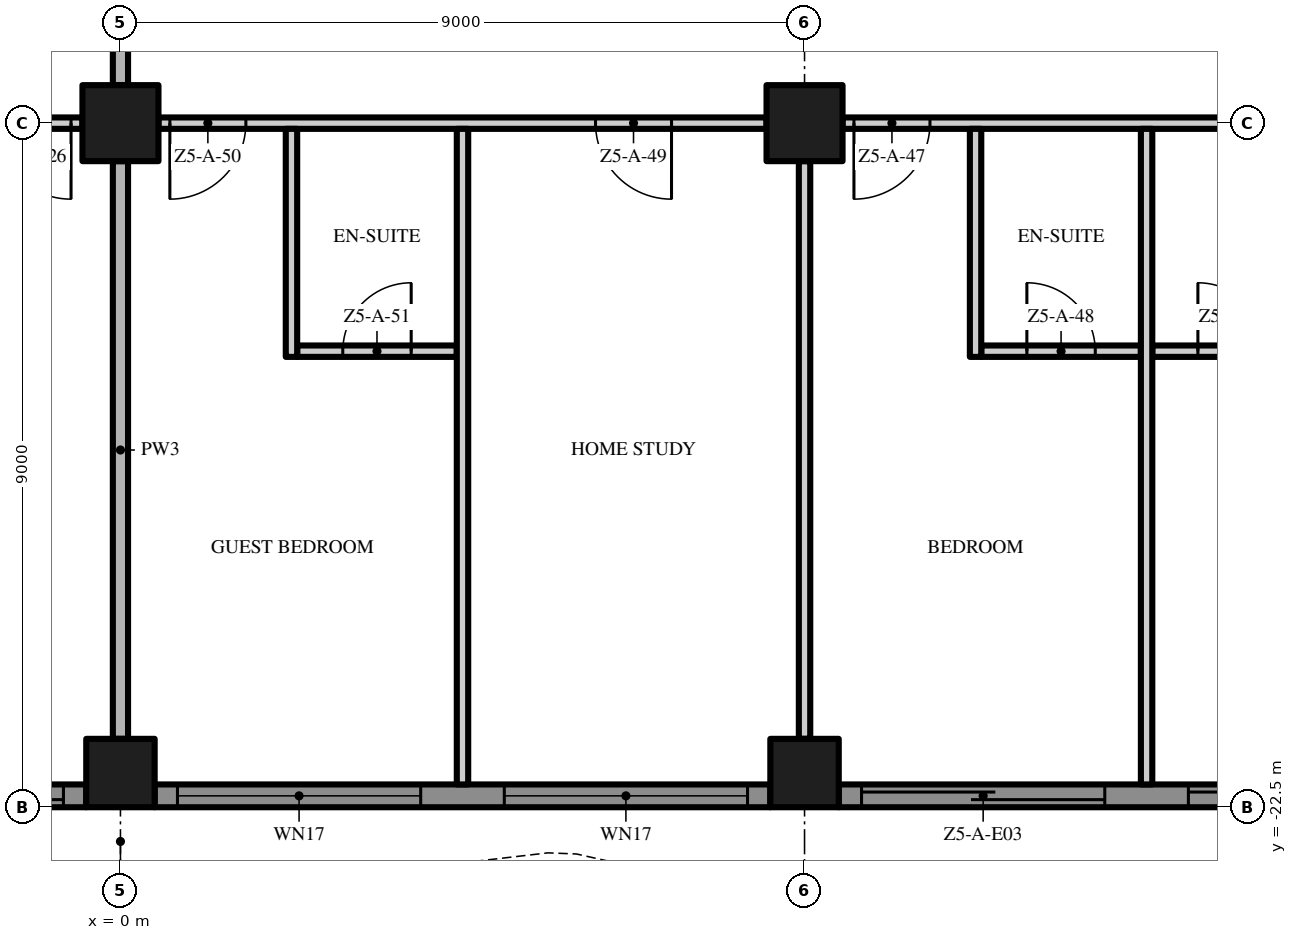
"""IFC4 building model, lengths in metres.
Left out: names, types, materials, properties, quantities, classifications, styles, units other than length and angle.
Written with IfcOpenShell. Run it as: python <this file> out.ifc"""

import sys

from ifc_helpers import new_model, si_unit, direction, frame, frame_2d, origin, origin_2d, place, context, subcontext, project, spatial, polyline, rectangle, outline, extrude, element, fill, save


model = new_model("IFC4")
c1 = context("Model", 3, precision=1e-05, world=origin(), true_north=direction((0.0, 1.0)))
c2 = subcontext(c1, "Body", "Model", "MODEL_VIEW")
j1 = project(units=[si_unit("LENGTHUNIT", "METRE"), si_unit("PLANEANGLEUNIT", "RADIAN")], contexts=[c1])
p1 = place(None, origin())
s1 = spatial("IfcSite", under=j1, at=p1, CompositionType="ELEMENT")
p2 = place(p1, origin())
s2 = spatial("IfcBuilding", under=s1, at=p2, CompositionType="ELEMENT")
p3 = place(p2, frame((0.0, 0.0, 238.8)))
s3 = spatial("IfcBuildingStorey", under=s2, at=p3, CompositionType="ELEMENT", Elevation=238.8)
p4 = place(p3, frame((0.0, -13.5, 0.0), z_axis=(0.0, 0.0, 1.0), x_axis=(1.0, 0.0, 0.0)))
e1 = element("IfcColumn", 1, at=p4, inside=s3, PredefinedType="COLUMN", context=c2, shape_type="SweptSolid", body=[
    extrude(rectangle(XDim=1.0, YDim=1.0, at=origin_2d()), origin(), (0.0, 0.0, 1.0), 3.5),
])
p5 = place(p3, frame((0.0, -22.05, 0.0), z_axis=(0.0, 0.0, 1.0), x_axis=(1.0, 0.0, 0.0)))
e2 = element("IfcColumn", 2, at=p5, inside=s3, PredefinedType="COLUMN", context=c2, shape_type="SweptSolid", body=[
    extrude(rectangle(XDim=0.9, YDim=0.9, at=origin_2d()), origin(), (0.0, 0.0, 1.0), 3.5),
])
p6 = place(p3, frame((9.0, -13.5, 0.0), z_axis=(0.0, 0.0, 1.0), x_axis=(1.0, 0.0, 0.0)))
e3 = element("IfcColumn", 3, at=p6, inside=s3, PredefinedType="COLUMN", context=c2, shape_type="SweptSolid", body=[
    extrude(rectangle(XDim=1.0, YDim=1.0, at=origin_2d()), origin(), (0.0, 0.0, 1.0), 3.5),
])
p7 = place(p3, frame((9.0, -22.05, 0.0), z_axis=(0.0, 0.0, 1.0), x_axis=(1.0, 0.0, 0.0)))
e4 = element("IfcColumn", 4, at=p7, inside=s3, PredefinedType="COLUMN", context=c2, shape_type="SweptSolid", body=[
    extrude(rectangle(XDim=0.9, YDim=0.9, at=origin_2d()), origin(), (0.0, 0.0, 1.0), 3.5),
])
p8 = place(p3, frame((-0.45, -22.35, 0.0), z_axis=(0.0, 0.0, 1.0), x_axis=(-1.0, 0.0, 0.0)))
e5 = element("IfcWall", 5, at=p8, inside=s3, PredefinedType="SOLIDWALL", context=c2, shape_type="SweptSolid", body=[
    extrude(rectangle(XDim=8.1, YDim=0.3, at=frame_2d((4.05, 0.0))), origin(), (0.0, 0.0, 1.0), 3.5),
])
p9 = place(p8, frame((4.6, 0.0, 0.45)))
e6 = element("IfcOpeningElement", 6, at=p9, cuts=e5, PredefinedType="OPENING", context=c2, shape_type="SweptSolid", body=[
    extrude(rectangle(XDim=3.2, YDim=2.65, at=frame_2d((1.6, 1.325))), frame((0.0, 0.16, 0.0), z_axis=(0.0, -1.0, 0.0), x_axis=(1.0, 0.0, 0.0)), (0.0, 0.0, 1.0), 0.32),
])
p10 = place(p8, frame((0.3, 0.0, 0.0)))
e7 = element("IfcOpeningElement", 7, at=p10, cuts=e5, PredefinedType="OPENING", context=c2, shape_type="SweptSolid", body=[
    extrude(rectangle(XDim=3.2, YDim=2.4, at=frame_2d((1.6, 1.2))), frame((0.0, 0.16, 0.0), z_axis=(0.0, -1.0, 0.0), x_axis=(1.0, 0.0, 0.0)), (0.0, 0.0, 1.0), 0.32),
])
p11 = place(p3, frame((8.55, -22.35, 0.0), z_axis=(0.0, 0.0, 1.0), x_axis=(-1.0, 0.0, 0.0)))
e8 = element("IfcWall", 8, at=p11, inside=s3, PredefinedType="SOLIDWALL", context=c2, shape_type="SweptSolid", body=[
    extrude(rectangle(XDim=8.1, YDim=0.3, at=frame_2d((4.05, 0.0))), origin(), (0.0, 0.0, 1.0), 3.5),
])
p12 = place(p11, frame((4.6, 0.0, 0.45)))
e9 = element("IfcOpeningElement", 9, at=p12, cuts=e8, PredefinedType="OPENING", context=c2, shape_type="SweptSolid", body=[
    extrude(rectangle(XDim=3.2, YDim=2.65, at=frame_2d((1.6, 1.325))), frame((0.0, 0.16, 0.0), z_axis=(0.0, -1.0, 0.0), x_axis=(1.0, 0.0, 0.0)), (0.0, 0.0, 1.0), 0.32),
])
p13 = place(p11, frame((0.3, 0.0, 0.45)))
e10 = element("IfcOpeningElement", 10, at=p13, cuts=e8, PredefinedType="OPENING", context=c2, shape_type="SweptSolid", body=[
    extrude(rectangle(XDim=3.2, YDim=2.65, at=frame_2d((1.6, 1.325))), frame((0.0, 0.16, 0.0), z_axis=(0.0, -1.0, 0.0), x_axis=(1.0, 0.0, 0.0)), (0.0, 0.0, 1.0), 0.32),
])
p14 = place(p3, frame((17.55, -22.35, 0.0), z_axis=(0.0, 0.0, 1.0), x_axis=(-1.0, 0.0, 0.0)))
e11 = element("IfcWall", 11, at=p14, inside=s3, PredefinedType="SOLIDWALL", context=c2, shape_type="SweptSolid", body=[
    extrude(rectangle(XDim=8.1, YDim=0.3, at=frame_2d((4.05, 0.0))), origin(), (0.0, 0.0, 1.0), 3.5),
])
p15 = place(p14, frame((4.6, 0.0, 0.0)))
e12 = element("IfcOpeningElement", 12, at=p15, cuts=e11, PredefinedType="OPENING", context=c2, shape_type="SweptSolid", body=[
    extrude(rectangle(XDim=3.2, YDim=2.4, at=frame_2d((1.6, 1.2))), frame((0.0, 0.16, 0.0), z_axis=(0.0, -1.0, 0.0), x_axis=(1.0, 0.0, 0.0)), (0.0, 0.0, 1.0), 0.32),
])
p16 = place(p14, frame((0.3, 0.0, 0.0)))
e13 = element("IfcOpeningElement", 13, at=p16, cuts=e11, PredefinedType="OPENING", context=c2, shape_type="SweptSolid", body=[
    extrude(rectangle(XDim=3.2, YDim=2.4, at=frame_2d((1.6, 1.2))), frame((0.0, 0.16, 0.0), z_axis=(0.0, -1.0, 0.0), x_axis=(1.0, 0.0, 0.0)), (0.0, 0.0, 1.0), 0.32),
])
p17 = place(p3, origin())
e14 = element("IfcWall", 14, at=p17, inside=s3, PredefinedType="USERDEFINED", context=c2, shape_type="SweptSolid", body=[
    extrude(outline(polyline([(-22.5, -23.451), (-21.0, -24.112), (-19.5, -24.845), (-18.0, -25.369), (-16.875, -25.5), (-16.5, -25.485), (-15.0, -25.149), (-13.5, -24.488), (-12.0, -23.755), (-10.5, -23.231), (-9.375, -23.1), (-9.0, -23.115), (-7.5, -23.451), (-6.0, -24.112), (-4.5, -24.845), (-3.0, -25.369), (-1.875, -25.5), (-1.5, -25.485), (0.0, -25.149), (1.5, -24.488), (3.0, -23.755), (4.5, -23.231), (5.625, -23.1), (6.0, -23.115), (7.5, -23.451), (9.0, -24.112), (10.5, -24.845), (12.0, -25.369), (13.125, -25.5), (13.5, -25.485), (15.0, -25.149), (16.5, -24.488), (18.0, -23.755), (19.5, -23.231), (20.625, -23.1), (21.0, -23.115), (22.5, -23.451), (22.555, -23.208), (21.033, -22.866), (20.615, -22.849), (19.444, -22.986), (17.904, -23.524), (16.395, -24.261), (14.921, -24.91), (13.467, -25.236), (13.135, -25.249), (12.056, -25.124), (10.596, -24.614), (9.105, -23.885), (7.579, -23.213), (6.033, -22.866), (5.615, -22.849), (4.444, -22.986), (2.904, -23.524), (1.395, -24.261), (-0.079, -24.91), (-1.533, -25.236), (-1.865, -25.249), (-2.944, -25.124), (-4.404, -24.614), (-5.895, -23.885), (-7.421, -23.213), (-8.967, -22.866), (-9.385, -22.849), (-10.556, -22.986), (-12.096, -23.524), (-13.605, -24.261), (-15.079, -24.91), (-16.533, -25.236), (-16.865, -25.249), (-17.944, -25.124), (-19.404, -24.614), (-20.895, -23.885), (-22.399, -23.223), (-22.5, -23.451)])), origin(), (0.0, 0.0, 1.0), 0.9),
])
p18 = place(p3, frame((2.325, -16.5, 0.0), z_axis=(0.0, 0.0, 1.0), x_axis=(1.0, 0.0, 0.0)))
e15 = element("IfcWall", 15, at=p18, inside=s3, PredefinedType="PARTITIONING", context=c2, shape_type="SweptSolid", body=[
    extrude(rectangle(XDim=2.1, YDim=0.15, at=frame_2d((1.05, 0.0))), origin(), (0.0, 0.0, 1.0), 3.5),
])
p19 = place(p18, frame((0.6, 0.0, 0.0)))
e16 = element("IfcOpeningElement", 16, at=p19, cuts=e15, PredefinedType="OPENING", context=c2, shape_type="SweptSolid", body=[
    extrude(rectangle(XDim=0.9, YDim=2.1, at=frame_2d((0.45, 1.05))), frame((0.0, 0.085, 0.0), z_axis=(0.0, -1.0, 0.0), x_axis=(1.0, 0.0, 0.0)), (0.0, 0.0, 1.0), 0.17),
])
p20 = place(p3, frame((11.325, -16.5, 0.0), z_axis=(0.0, 0.0, 1.0), x_axis=(1.0, 0.0, 0.0)))
e17 = element("IfcWall", 17, at=p20, inside=s3, PredefinedType="PARTITIONING", context=c2, shape_type="SweptSolid", body=[
    extrude(rectangle(XDim=2.1, YDim=0.15, at=frame_2d((1.05, 0.0))), origin(), (0.0, 0.0, 1.0), 3.5),
])
p21 = place(p20, frame((0.6, 0.0, 0.0)))
e18 = element("IfcOpeningElement", 18, at=p21, cuts=e17, PredefinedType="OPENING", context=c2, shape_type="SweptSolid", body=[
    extrude(rectangle(XDim=0.9, YDim=2.1, at=frame_2d((0.45, 1.05))), frame((0.0, 0.085, 0.0), z_axis=(0.0, -1.0, 0.0), x_axis=(1.0, 0.0, 0.0)), (0.0, 0.0, 1.0), 0.17),
])
p22 = place(p3, frame((13.575, -16.5, 0.0), z_axis=(0.0, 0.0, 1.0), x_axis=(1.0, 0.0, 0.0)))
e19 = element("IfcWall", 19, at=p22, inside=s3, PredefinedType="PARTITIONING", context=c2, shape_type="SweptSolid", body=[
    extrude(rectangle(XDim=2.1, YDim=0.15, at=frame_2d((1.05, 0.0))), origin(), (0.0, 0.0, 1.0), 3.5),
])
p23 = place(p22, frame((0.6, 0.0, 0.0)))
e20 = element("IfcOpeningElement", 20, at=p23, cuts=e19, PredefinedType="OPENING", context=c2, shape_type="SweptSolid", body=[
    extrude(rectangle(XDim=0.9, YDim=2.1, at=frame_2d((0.45, 1.05))), frame((0.0, 0.085, 0.0), z_axis=(0.0, -1.0, 0.0), x_axis=(1.0, 0.0, 0.0)), (0.0, 0.0, 1.0), 0.17),
])
p24 = place(p3, frame((-0.5, -13.5, 0.0), z_axis=(0.0, 0.0, 1.0), x_axis=(-1.0, 0.0, 0.0)))
e21 = element("IfcWall", 21, at=p24, inside=s3, PredefinedType="PARTITIONING", context=c2, shape_type="SweptSolid", body=[
    extrude(rectangle(XDim=8.0, YDim=0.15, at=frame_2d((4.0, 0.0))), origin(), (0.0, 0.0, 1.0), 3.5),
])
p25 = place(p24, frame((0.15, 0.0, 0.0)))
e22 = element("IfcOpeningElement", 22, at=p25, cuts=e21, PredefinedType="OPENING", context=c2, shape_type="SweptSolid", body=[
    extrude(rectangle(XDim=1.0, YDim=2.4, at=frame_2d((0.5, 1.2))), frame((0.0, 0.085, 0.0), z_axis=(0.0, -1.0, 0.0), x_axis=(1.0, 0.0, 0.0)), (0.0, 0.0, 1.0), 0.17),
])
p26 = place(p24, frame((6.85, 0.0, 0.0)))
e23 = element("IfcOpeningElement", 23, at=p26, cuts=e21, PredefinedType="OPENING", context=c2, shape_type="SweptSolid", body=[
    extrude(rectangle(XDim=1.0, YDim=2.4, at=frame_2d((0.5, 1.2))), frame((0.0, 0.085, 0.0), z_axis=(0.0, -1.0, 0.0), x_axis=(1.0, 0.0, 0.0)), (0.0, 0.0, 1.0), 0.17),
])
p27 = place(p3, frame((8.5, -13.5, 0.0), z_axis=(0.0, 0.0, 1.0), x_axis=(-1.0, 0.0, 0.0)))
e24 = element("IfcWall", 24, at=p27, inside=s3, PredefinedType="PARTITIONING", context=c2, shape_type="SweptSolid", body=[
    extrude(rectangle(XDim=8.0, YDim=0.15, at=frame_2d((4.0, 0.0))), origin(), (0.0, 0.0, 1.0), 3.5),
])
p28 = place(p27, frame((1.25, 0.0, 0.0)))
e25 = element("IfcOpeningElement", 25, at=p28, cuts=e24, PredefinedType="OPENING", context=c2, shape_type="SweptSolid", body=[
    extrude(rectangle(XDim=1.0, YDim=2.4, at=frame_2d((0.5, 1.2))), frame((0.0, 0.085, 0.0), z_axis=(0.0, -1.0, 0.0), x_axis=(1.0, 0.0, 0.0)), (0.0, 0.0, 1.0), 0.17),
])
p29 = place(p27, frame((6.85, 0.0, 0.0)))
e26 = element("IfcOpeningElement", 26, at=p29, cuts=e24, PredefinedType="OPENING", context=c2, shape_type="SweptSolid", body=[
    extrude(rectangle(XDim=1.0, YDim=2.4, at=frame_2d((0.5, 1.2))), frame((0.0, 0.085, 0.0), z_axis=(0.0, -1.0, 0.0), x_axis=(1.0, 0.0, 0.0)), (0.0, 0.0, 1.0), 0.17),
])
p30 = place(p3, frame((17.5, -13.5, 0.0), z_axis=(0.0, 0.0, 1.0), x_axis=(-1.0, 0.0, 0.0)))
e27 = element("IfcWall", 27, at=p30, inside=s3, PredefinedType="PARTITIONING", context=c2, shape_type="SweptSolid", body=[
    extrude(rectangle(XDim=8.0, YDim=0.15, at=frame_2d((4.0, 0.0))), origin(), (0.0, 0.0, 1.0), 3.5),
])
p31 = place(p30, frame((0.15, 0.0, 0.0)))
e28 = element("IfcOpeningElement", 28, at=p31, cuts=e27, PredefinedType="OPENING", context=c2, shape_type="SweptSolid", body=[
    extrude(rectangle(XDim=1.0, YDim=2.4, at=frame_2d((0.5, 1.2))), frame((0.0, 0.085, 0.0), z_axis=(0.0, -1.0, 0.0), x_axis=(1.0, 0.0, 0.0)), (0.0, 0.0, 1.0), 0.17),
])
p32 = place(p30, frame((6.85, 0.0, 0.0)))
e29 = element("IfcOpeningElement", 29, at=p32, cuts=e27, PredefinedType="OPENING", context=c2, shape_type="SweptSolid", body=[
    extrude(rectangle(XDim=1.0, YDim=2.4, at=frame_2d((0.5, 1.2))), frame((0.0, 0.085, 0.0), z_axis=(0.0, -1.0, 0.0), x_axis=(1.0, 0.0, 0.0)), (0.0, 0.0, 1.0), 0.17),
])
p33 = place(p3, frame((0.0, -21.6, 0.0), z_axis=(0.0, 0.0, 1.0), x_axis=(0.0, 1.0, 0.0)))
e30 = element("IfcWall", 30, at=p33, inside=s3, PredefinedType="PARTITIONING", context=c2, shape_type="SweptSolid", body=[
    extrude(rectangle(XDim=7.6, YDim=0.2, at=frame_2d((3.8, 0.0))), origin(), (0.0, 0.0, 1.0), 3.5),
])
p34 = place(p3, frame((0.0, -13.0, 0.0), z_axis=(0.0, 0.0, 1.0), x_axis=(0.0, 1.0, 0.0)))
e31 = element("IfcWall", 31, at=p34, inside=s3, PredefinedType="PARTITIONING", context=c2, shape_type="SweptSolid", body=[
    extrude(rectangle(XDim=8.0, YDim=0.2, at=frame_2d((4.0, 0.0))), origin(), (0.0, 0.0, 1.0), 3.5),
])
p35 = place(p3, frame((2.25, -16.575, 0.0), z_axis=(0.0, 0.0, 1.0), x_axis=(0.0, 1.0, 0.0)))
e32 = element("IfcWall", 32, at=p35, inside=s3, PredefinedType="PARTITIONING", context=c2, shape_type="SweptSolid", body=[
    extrude(rectangle(XDim=3.0, YDim=0.15, at=frame_2d((1.5, 0.0))), origin(), (0.0, 0.0, 1.0), 3.5),
])
p36 = place(p3, frame((4.5, -22.2, 0.0), z_axis=(0.0, 0.0, 1.0), x_axis=(0.0, 1.0, 0.0)))
e33 = element("IfcWall", 33, at=p36, inside=s3, PredefinedType="PARTITIONING", context=c2, shape_type="SweptSolid", body=[
    extrude(rectangle(XDim=8.625, YDim=0.15, at=frame_2d((4.312, 0.0))), origin(), (0.0, 0.0, 1.0), 3.5),
])
p37 = place(p3, frame((9.0, -21.6, 0.0), z_axis=(0.0, 0.0, 1.0), x_axis=(0.0, 1.0, 0.0)))
e34 = element("IfcWall", 34, at=p37, inside=s3, PredefinedType="PARTITIONING", context=c2, shape_type="SweptSolid", body=[
    extrude(rectangle(XDim=7.6, YDim=0.15, at=frame_2d((3.8, 0.0))), origin(), (0.0, 0.0, 1.0), 3.5),
])
p38 = place(p3, frame((11.25, -16.575, 0.0), z_axis=(0.0, 0.0, 1.0), x_axis=(0.0, 1.0, 0.0)))
e35 = element("IfcWall", 35, at=p38, inside=s3, PredefinedType="PARTITIONING", context=c2, shape_type="SweptSolid", body=[
    extrude(rectangle(XDim=3.0, YDim=0.15, at=frame_2d((1.5, 0.0))), origin(), (0.0, 0.0, 1.0), 3.5),
])
p39 = place(p3, frame((13.5, -22.2, 0.0), z_axis=(0.0, 0.0, 1.0), x_axis=(0.0, 1.0, 0.0)))
e36 = element("IfcWall", 36, at=p39, inside=s3, PredefinedType="PARTITIONING", context=c2, shape_type="SweptSolid", body=[
    extrude(rectangle(XDim=8.625, YDim=0.15, at=frame_2d((4.312, 0.0))), origin(), (0.0, 0.0, 1.0), 3.5),
])
p40 = place(p10, origin())
e37 = element("IfcDoor", 37, at=p40, inside=s3, OperationType="SINGLE_SWING_LEFT", PredefinedType="DOOR", context=c2, shape_type="SweptSolid", body=[
    extrude(rectangle(XDim=3.2, YDim=2.4, at=frame_2d((1.6, 1.2))), frame((0.0, 0.025, 0.0), z_axis=(0.0, -1.0, 0.0), x_axis=(1.0, 0.0, 0.0)), (0.0, 0.0, 1.0), 0.05),
])
fill(e7, e37)
p41 = place(p12, origin())
e38 = element("IfcWindow", 38, at=p41, inside=s3, PartitioningType="SINGLE_PANEL", PredefinedType="WINDOW", context=c2, shape_type="SweptSolid", body=[
    extrude(rectangle(XDim=3.2, YDim=2.65, at=frame_2d((1.6, 1.325))), frame((0.0, 0.03, 0.0), z_axis=(0.0, -1.0, 0.0), x_axis=(1.0, 0.0, 0.0)), (0.0, 0.0, 1.0), 0.06),
])
fill(e9, e38)
p42 = place(p13, origin())
e39 = element("IfcWindow", 39, at=p42, inside=s3, PartitioningType="SINGLE_PANEL", PredefinedType="WINDOW", context=c2, shape_type="SweptSolid", body=[
    extrude(rectangle(XDim=3.2, YDim=2.65, at=frame_2d((1.6, 1.325))), frame((0.0, 0.03, 0.0), z_axis=(0.0, -1.0, 0.0), x_axis=(1.0, 0.0, 0.0)), (0.0, 0.0, 1.0), 0.06),
])
fill(e10, e39)
p43 = place(p15, origin())
e40 = element("IfcDoor", 40, at=p43, inside=s3, OperationType="SINGLE_SWING_LEFT", PredefinedType="DOOR", context=c2, shape_type="SweptSolid", body=[
    extrude(rectangle(XDim=3.2, YDim=2.4, at=frame_2d((1.6, 1.2))), frame((0.0, 0.025, 0.0), z_axis=(0.0, -1.0, 0.0), x_axis=(1.0, 0.0, 0.0)), (0.0, 0.0, 1.0), 0.05),
])
fill(e12, e40)
p44 = place(p16, origin())
e41 = element("IfcDoor", 41, at=p44, inside=s3, OperationType="SINGLE_SWING_LEFT", PredefinedType="DOOR", context=c2, shape_type="SweptSolid", body=[
    extrude(rectangle(XDim=3.2, YDim=2.4, at=frame_2d((1.6, 1.2))), frame((0.0, 0.025, 0.0), z_axis=(0.0, -1.0, 0.0), x_axis=(1.0, 0.0, 0.0)), (0.0, 0.0, 1.0), 0.05),
])
fill(e13, e41)
p45 = place(p25, origin())
e42 = element("IfcDoor", 42, at=p45, inside=s3, OperationType="SINGLE_SWING_LEFT", PredefinedType="DOOR", context=c2, shape_type="SweptSolid", body=[
    extrude(rectangle(XDim=1.0, YDim=2.4, at=frame_2d((0.5, 1.2))), frame((0.0, 0.025, 0.0), z_axis=(0.0, -1.0, 0.0), x_axis=(1.0, 0.0, 0.0)), (0.0, 0.0, 1.0), 0.05),
])
fill(e22, e42)
p46 = place(p23, origin())
e43 = element("IfcDoor", 43, at=p46, inside=s3, OperationType="SINGLE_SWING_LEFT", PredefinedType="DOOR", context=c2, shape_type="SweptSolid", body=[
    extrude(rectangle(XDim=0.9, YDim=2.1, at=frame_2d((0.45, 1.05))), frame((0.0, 0.025, 0.0), z_axis=(0.0, -1.0, 0.0), x_axis=(1.0, 0.0, 0.0)), (0.0, 0.0, 1.0), 0.05),
])
fill(e20, e43)
p47 = place(p32, origin())
e44 = element("IfcDoor", 44, at=p47, inside=s3, OperationType="SINGLE_SWING_RIGHT", PredefinedType="DOOR", context=c2, shape_type="SweptSolid", body=[
    extrude(rectangle(XDim=1.0, YDim=2.4, at=frame_2d((0.5, 1.2))), frame((0.0, 0.025, 0.0), z_axis=(0.0, -1.0, 0.0), x_axis=(1.0, 0.0, 0.0)), (0.0, 0.0, 1.0), 0.05),
])
fill(e29, e44)
p48 = place(p21, origin())
e45 = element("IfcDoor", 45, at=p48, inside=s3, OperationType="SINGLE_SWING_LEFT", PredefinedType="DOOR", context=c2, shape_type="SweptSolid", body=[
    extrude(rectangle(XDim=0.9, YDim=2.1, at=frame_2d((0.45, 1.05))), frame((0.0, 0.025, 0.0), z_axis=(0.0, -1.0, 0.0), x_axis=(1.0, 0.0, 0.0)), (0.0, 0.0, 1.0), 0.05),
])
fill(e18, e45)
p49 = place(p28, origin())
e46 = element("IfcDoor", 46, at=p49, inside=s3, OperationType="SINGLE_SWING_LEFT", PredefinedType="DOOR", context=c2, shape_type="SweptSolid", body=[
    extrude(rectangle(XDim=1.0, YDim=2.4, at=frame_2d((0.5, 1.2))), frame((0.0, 0.025, 0.0), z_axis=(0.0, -1.0, 0.0), x_axis=(1.0, 0.0, 0.0)), (0.0, 0.0, 1.0), 0.05),
])
fill(e25, e46)
p50 = place(p29, origin())
e47 = element("IfcDoor", 47, at=p50, inside=s3, OperationType="SINGLE_SWING_RIGHT", PredefinedType="DOOR", context=c2, shape_type="SweptSolid", body=[
    extrude(rectangle(XDim=1.0, YDim=2.4, at=frame_2d((0.5, 1.2))), frame((0.0, 0.025, 0.0), z_axis=(0.0, -1.0, 0.0), x_axis=(1.0, 0.0, 0.0)), (0.0, 0.0, 1.0), 0.05),
])
fill(e26, e47)
p51 = place(p19, origin())
e48 = element("IfcDoor", 48, at=p51, inside=s3, OperationType="SINGLE_SWING_RIGHT", PredefinedType="DOOR", context=c2, shape_type="SweptSolid", body=[
    extrude(rectangle(XDim=0.9, YDim=2.1, at=frame_2d((0.45, 1.05))), frame((0.0, 0.025, 0.0), z_axis=(0.0, -1.0, 0.0), x_axis=(1.0, 0.0, 0.0)), (0.0, 0.0, 1.0), 0.05),
])
fill(e16, e48)
save(model, sys.argv[1])
